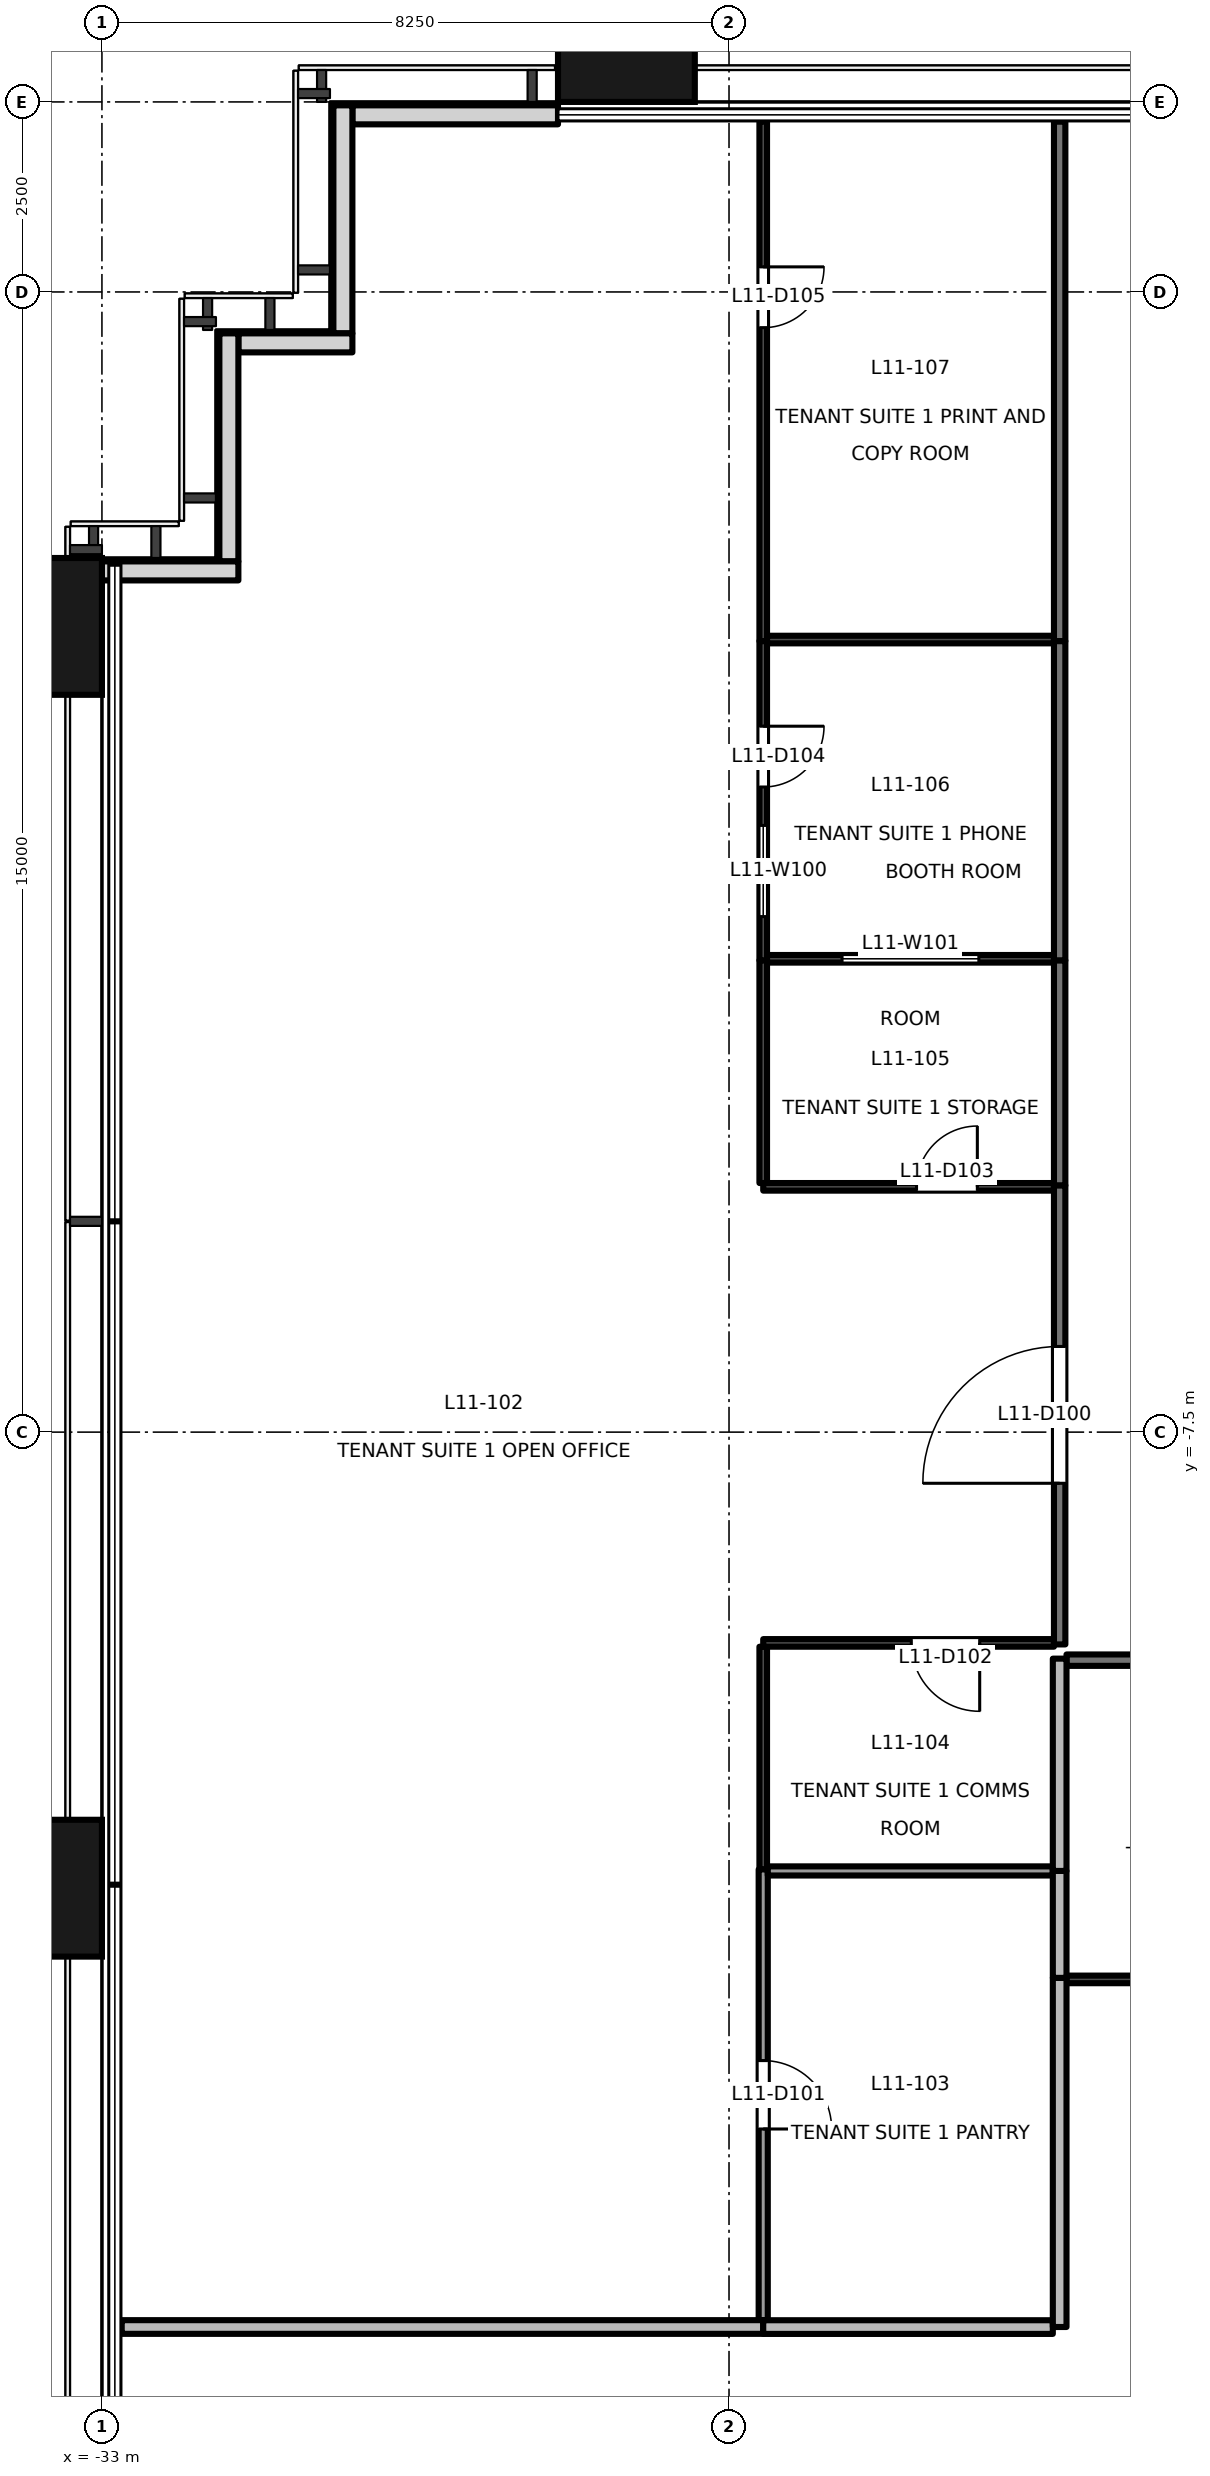
"""IFC4 building model, lengths in metres.
Left out: names, types, materials, properties, quantities, classifications, styles, units other than length and angle.
Written with IfcOpenShell. Run it as: python <this file> out.ifc"""

import sys

from ifc_helpers import new_model, si_unit, direction, frame, frame_2d, origin, origin_2d, place, context, subcontext, project, spatial, rectangle, extrude, element, fill, save


model = new_model("IFC4")
c1 = context("Model", 3, precision=1e-05, world=origin(), true_north=direction((0.0, 1.0)))
c2 = subcontext(c1, "Body", "Model", "MODEL_VIEW")
j1 = project(units=[si_unit("LENGTHUNIT", "METRE"), si_unit("PLANEANGLEUNIT", "RADIAN")], contexts=[c1])
p1 = place(None, origin())
s1 = spatial("IfcSite", under=j1, at=p1, CompositionType="ELEMENT")
p2 = place(p1, origin())
s2 = spatial("IfcBuilding", under=s1, at=p2, CompositionType="ELEMENT")
p3 = place(p2, frame((0.0, 0.0, 52.9)))
s3 = spatial("IfcBuildingStorey", under=s2, at=p3, CompositionType="ELEMENT", Elevation=52.9)
for number, where, z_axis, x_axis in (
    (1, (-33.9, -13.5, -0.2), (0.0, 0.0, 1.0), (0.0, 1.0, 0.0)),
    (2, (-33.9, 3.1, -0.2), (0.0, 0.0, 1.0), (0.0, 1.0, 0.0)),
    (3, (-26.1, 10.9, -0.2), (0.0, 0.0, 1.0), (1.0, 0.0, 0.0)),
):
    element("IfcColumn", number, at=place(p3, frame(where, z_axis=z_axis, x_axis=x_axis)), inside=s3, PredefinedType="COLUMN", context=c2, shape_type="SweptSolid", body=[
        extrude(rectangle(XDim=1.8, YDim=1.8, at=origin_2d()), origin(), (0.0, 0.0, 1.0), 4.1),
    ])
p4 = place(p3, frame((-27.0, 9.83, 0.0), z_axis=(0.0, 0.0, 1.0), x_axis=(-1.0, 0.0, 0.0)))
e4 = element("IfcWall", 4, at=p4, inside=s3, PredefinedType="SOLIDWALL", context=c2, shape_type="SweptSolid", body=[
    extrude(rectangle(XDim=2.705, YDim=0.25, at=frame_2d((1.353, 0.0))), origin(), (0.0, 0.0, 1.0), 3.9),
])
p5 = place(p3, frame((-29.83, 9.955, 0.0), z_axis=(0.0, 0.0, 1.0), x_axis=(0.0, -1.0, 0.0)))
e5 = element("IfcWall", 5, at=p5, inside=s3, PredefinedType="SOLIDWALL", context=c2, shape_type="SweptSolid", body=[
    extrude(rectangle(XDim=3.0, YDim=0.25, at=frame_2d((1.5, 0.0))), origin(), (0.0, 0.0, 1.0), 3.9),
])
p6 = place(p3, frame((-29.705, 6.83, 0.0), z_axis=(0.0, 0.0, 1.0), x_axis=(-1.0, 0.0, 0.0)))
e6 = element("IfcWall", 6, at=p6, inside=s3, PredefinedType="SOLIDWALL", context=c2, shape_type="SweptSolid", body=[
    extrude(rectangle(XDim=1.5, YDim=0.25, at=frame_2d((0.75, 0.0))), origin(), (0.0, 0.0, 1.0), 3.9),
])
p7 = place(p3, frame((-31.33, 6.955, 0.0), z_axis=(0.0, 0.0, 1.0), x_axis=(0.0, -1.0, 0.0)))
e7 = element("IfcWall", 7, at=p7, inside=s3, PredefinedType="SOLIDWALL", context=c2, shape_type="SweptSolid", body=[
    extrude(rectangle(XDim=3.0, YDim=0.25, at=frame_2d((1.5, 0.0))), origin(), (0.0, 0.0, 1.0), 3.9),
])
p8 = place(p3, frame((-31.205, 3.83, 0.0), z_axis=(0.0, 0.0, 1.0), x_axis=(-1.0, 0.0, 0.0)))
e8 = element("IfcWall", 8, at=p8, inside=s3, PredefinedType="SOLIDWALL", context=c2, shape_type="SweptSolid", body=[
    extrude(rectangle(XDim=1.8, YDim=0.25, at=frame_2d((0.9, 0.0))), origin(), (0.0, 0.0, 1.0), 3.9),
])
p9 = place(p3, frame((-20.4, -10.293, 0.0), z_axis=(0.0, 0.0, 1.0), x_axis=(0.0, 1.0, 0.0)))
e9 = element("IfcWall", 9, at=p9, inside=s3, PredefinedType="PARTITIONING", context=c2, shape_type="SweptSolid", body=[
    extrude(rectangle(XDim=6.04, YDim=0.15, at=frame_2d((3.02, 0.0))), origin(), (0.0, 0.0, 1.0), 3.3),
])
p10 = place(p9, frame((2.12, 0.0, 0.0)))
e10 = element("IfcOpeningElement", 10, at=p10, cuts=e9, PredefinedType="OPENING", context=c2, shape_type="SweptSolid", body=[
    extrude(rectangle(XDim=1.8, YDim=2.1, at=frame_2d((0.9, 1.05))), frame((0.0, 0.085, 0.0), z_axis=(0.0, -1.0, 0.0), x_axis=(1.0, 0.0, 0.0)), (0.0, 0.0, 1.0), 0.171),
])
p11 = place(p3, frame((-20.4, -4.253, 0.0), z_axis=(0.0, 0.0, 1.0), x_axis=(0.0, 1.0, 0.0)))
e11 = element("IfcWall", 11, at=p11, inside=s3, PredefinedType="PARTITIONING", context=c2, shape_type="SweptSolid", body=[
    extrude(rectangle(XDim=2.96, YDim=0.15, at=frame_2d((1.48, 0.0))), origin(), (0.0, 0.0, 1.0), 3.9),
])
p12 = place(p3, frame((-20.4, -1.293, 0.0), z_axis=(0.0, 0.0, 1.0), x_axis=(0.0, 1.0, 0.0)))
e12 = element("IfcWall", 12, at=p12, inside=s3, PredefinedType="PARTITIONING", context=c2, shape_type="SweptSolid", body=[
    extrude(rectangle(XDim=4.2, YDim=0.15, at=frame_2d((2.1, 0.0))), origin(), (0.0, 0.0, 1.0), 3.3),
])
p13 = place(p3, frame((-20.4, 2.907, 0.0), z_axis=(0.0, 0.0, 1.0), x_axis=(0.0, 1.0, 0.0)))
e13 = element("IfcWall", 13, at=p13, inside=s3, PredefinedType="PARTITIONING", context=c2, shape_type="SweptSolid", body=[
    extrude(rectangle(XDim=6.833, YDim=0.15, at=frame_2d((3.417, 0.0))), origin(), (0.0, 0.0, 1.0), 3.9),
])
p14 = place(p3, frame((-14.68, -10.5, 0.0), z_axis=(0.0, 0.0, 1.0), x_axis=(-1.0, 0.0, 0.0)))
e14 = element("IfcWall", 14, at=p14, inside=s3, PredefinedType="PARTITIONING", context=c2, shape_type="SweptSolid", body=[
    extrude(rectangle(XDim=5.63, YDim=0.15, at=frame_2d((2.815, 0.0))), origin(), (0.0, 0.0, 1.0), 2.5),
])
p15 = place(p3, frame((-24.3, -13.253, 0.0), z_axis=(0.0, 0.0, 1.0), x_axis=(0.0, -1.0, 0.0)))
e15 = element("IfcWall", 15, at=p15, inside=s3, PredefinedType="PARTITIONING", context=c2, shape_type="SweptSolid", body=[
    extrude(rectangle(XDim=5.93, YDim=0.12, at=frame_2d((2.965, 0.0))), origin(), (0.0, 0.0, 1.0), 3.3),
])
p16 = place(p15, frame((2.515, 0.0, 0.0)))
e16 = element("IfcOpeningElement", 16, at=p16, cuts=e15, PredefinedType="OPENING", context=c2, shape_type="SweptSolid", body=[
    extrude(rectangle(XDim=0.9, YDim=2.1, at=frame_2d((0.45, 1.05))), frame((0.0, 0.071, 0.0), z_axis=(0.0, -1.0, 0.0), x_axis=(1.0, 0.0, 0.0)), (0.0, 0.0, 1.0), 0.141),
])
p17 = place(p3, frame((-24.3, -10.323, 0.0), z_axis=(0.0, 0.0, 1.0), x_axis=(0.0, -1.0, 0.0)))
e17 = element("IfcWall", 17, at=p17, inside=s3, PredefinedType="PARTITIONING", context=c2, shape_type="SweptSolid", body=[
    extrude(rectangle(XDim=2.93, YDim=0.1, at=frame_2d((1.465, 0.0))), origin(), (0.0, 0.0, 1.0), 3.9),
])
p18 = place(p3, frame((-20.475, -10.273, 0.0), z_axis=(0.0, 0.0, 1.0), x_axis=(-1.0, 0.0, 0.0)))
e18 = element("IfcWall", 18, at=p18, inside=s3, PredefinedType="PARTITIONING", context=c2, shape_type="SweptSolid", body=[
    extrude(rectangle(XDim=3.825, YDim=0.1, at=frame_2d((1.913, 0.0))), origin(), (0.0, 0.0, 1.0), 3.9),
])
p19 = place(p18, frame((0.977, 0.0, 0.0)))
e19 = element("IfcOpeningElement", 19, at=p19, cuts=e18, PredefinedType="OPENING", context=c2, shape_type="SweptSolid", body=[
    extrude(rectangle(XDim=0.9, YDim=2.1, at=frame_2d((0.45, 1.05))), frame((0.0, 0.061, 0.0), z_axis=(0.0, -1.0, 0.0), x_axis=(1.0, 0.0, 0.0)), (0.0, 0.0, 1.0), 0.121),
])
p20 = place(p3, frame((-24.3, -1.293, 0.0), z_axis=(0.0, 0.0, 1.0), x_axis=(0.0, -1.0, 0.0)))
e20 = element("IfcWall", 20, at=p20, inside=s3, PredefinedType="PARTITIONING", context=c2, shape_type="SweptSolid", body=[
    extrude(rectangle(XDim=2.93, YDim=0.1, at=frame_2d((1.465, 0.0))), origin(), (0.0, 0.0, 1.0), 3.9),
])
p21 = place(p3, frame((-24.3, -4.273, 0.0), z_axis=(0.0, 0.0, 1.0), x_axis=(1.0, 0.0, 0.0)))
e21 = element("IfcWall", 21, at=p21, inside=s3, PredefinedType="PARTITIONING", context=c2, shape_type="SweptSolid", body=[
    extrude(rectangle(XDim=3.825, YDim=0.1, at=frame_2d((1.913, 0.0))), origin(), (0.0, 0.0, 1.0), 3.9),
])
p22 = place(p21, frame((2.017, 0.0, 0.0)))
e22 = element("IfcOpeningElement", 22, at=p22, cuts=e21, PredefinedType="OPENING", context=c2, shape_type="SweptSolid", body=[
    extrude(rectangle(XDim=0.8, YDim=2.1, at=frame_2d((0.4, 1.05))), frame((0.0, 0.061, 0.0), z_axis=(0.0, -1.0, 0.0), x_axis=(1.0, 0.0, 0.0)), (0.0, 0.0, 1.0), 0.121),
])
p23 = place(p3, frame((-24.3, 2.907, 0.0), z_axis=(0.0, 0.0, 1.0), x_axis=(0.0, -1.0, 0.0)))
e23 = element("IfcWall", 23, at=p23, inside=s3, PredefinedType="PARTITIONING", context=c2, shape_type="SweptSolid", body=[
    extrude(rectangle(XDim=4.2, YDim=0.1, at=frame_2d((2.1, 0.0))), origin(), (0.0, 0.0, 1.0), 3.3),
])
p24 = place(p23, frame((1.12, 0.0, 0.0)))
e24 = element("IfcOpeningElement", 24, at=p24, cuts=e23, PredefinedType="OPENING", context=c2, shape_type="SweptSolid", body=[
    extrude(rectangle(XDim=0.8, YDim=2.1, at=frame_2d((0.4, 1.05))), frame((0.0, 0.061, 0.0), z_axis=(0.0, -1.0, 0.0), x_axis=(1.0, 0.0, 0.0)), (0.0, 0.0, 1.0), 0.121),
])
p25 = place(p23, frame((2.425, 0.0, 0.9)))
e25 = element("IfcOpeningElement", 25, at=p25, cuts=e23, PredefinedType="OPENING", context=c2, shape_type="SweptSolid", body=[
    extrude(rectangle(XDim=1.2, YDim=1.2, at=frame_2d((0.6, 0.6))), frame((0.0, 0.061, 0.0), z_axis=(0.0, -1.0, 0.0), x_axis=(1.0, 0.0, 0.0)), (0.0, 0.0, 1.0), 0.121),
])
p26 = place(p3, frame((-24.3, 9.74, 0.0), z_axis=(0.0, 0.0, 1.0), x_axis=(0.0, -1.0, 0.0)))
e26 = element("IfcWall", 26, at=p26, inside=s3, PredefinedType="PARTITIONING", context=c2, shape_type="SweptSolid", body=[
    extrude(rectangle(XDim=6.833, YDim=0.1, at=frame_2d((3.417, 0.0))), origin(), (0.0, 0.0, 1.0), 3.9),
])
p27 = place(p26, frame((1.91, 0.0, 0.0)))
e27 = element("IfcOpeningElement", 27, at=p27, cuts=e26, PredefinedType="OPENING", context=c2, shape_type="SweptSolid", body=[
    extrude(rectangle(XDim=0.8, YDim=2.1, at=frame_2d((0.4, 1.05))), frame((0.0, 0.061, 0.0), z_axis=(0.0, -1.0, 0.0), x_axis=(1.0, 0.0, 0.0)), (0.0, 0.0, 1.0), 0.121),
])
p28 = place(p3, frame((-24.3, -19.273, 0.0), z_axis=(0.0, 0.0, 1.0), x_axis=(-1.0, 0.0, 0.0)))
e28 = element("IfcWall", 28, at=p28, inside=s3, PredefinedType="PARTITIONING", context=c2, shape_type="SweptSolid", body=[
    extrude(rectangle(XDim=8.44, YDim=0.18, at=frame_2d((4.22, 0.0))), origin(), (0.0, 0.0, 1.0), 3.9),
])
p29 = place(p3, frame((-24.24, -13.273, 0.0), z_axis=(0.0, 0.0, 1.0), x_axis=(1.0, 0.0, 0.0)))
e29 = element("IfcWall", 29, at=p29, inside=s3, PredefinedType="PARTITIONING", context=c2, shape_type="SweptSolid", body=[
    extrude(rectangle(XDim=3.75, YDim=0.12, at=frame_2d((1.875, 0.0))), origin(), (0.0, 0.0, 1.0), 3.9),
])
p30 = place(p3, frame((-20.49, -19.274, 0.0), z_axis=(0.0, 0.0, 1.0), x_axis=(-1.0, 0.0, 0.0)))
e30 = element("IfcWall", 30, at=p30, inside=s3, PredefinedType="PARTITIONING", context=c2, shape_type="SweptSolid", body=[
    extrude(rectangle(XDim=3.81, YDim=0.18, at=frame_2d((1.905, 0.0))), origin(), (0.0, 0.0, 1.0), 3.9),
])
p31 = place(p3, frame((-20.4, -14.68, 0.0), z_axis=(0.0, 0.0, 1.0), x_axis=(0.0, -1.0, 0.0)))
e31 = element("IfcWall", 31, at=p31, inside=s3, PredefinedType="PARTITIONING", context=c2, shape_type="SweptSolid", body=[
    extrude(rectangle(XDim=4.593, YDim=0.18, at=frame_2d((2.296, 0.0))), origin(), (0.0, 0.0, 1.0), 3.3),
])
p32 = place(p3, frame((-20.4, -13.273, 0.0), z_axis=(0.0, 0.0, 1.0), x_axis=(0.0, -1.0, 0.0)))
e32 = element("IfcWall", 32, at=p32, inside=s3, PredefinedType="PARTITIONING", context=c2, shape_type="SweptSolid", body=[
    extrude(rectangle(XDim=1.407, YDim=0.18, at=frame_2d((0.704, 0.0))), origin(), (0.0, 0.0, 1.0), 3.3),
])
p33 = place(p3, frame((-20.4, -10.48, 0.0), z_axis=(0.0, 0.0, 1.0), x_axis=(0.0, -1.0, 0.0)))
e33 = element("IfcWall", 33, at=p33, inside=s3, PredefinedType="PARTITIONING", context=c2, shape_type="SweptSolid", body=[
    extrude(rectangle(XDim=2.793, YDim=0.18, at=frame_2d((1.396, 0.0))), origin(), (0.0, 0.0, 1.0), 3.9),
])
p34 = place(p3, frame((-24.25, -1.273, 0.0), z_axis=(0.0, 0.0, 1.0), x_axis=(1.0, 0.0, 0.0)))
e34 = element("IfcWall", 34, at=p34, inside=s3, PredefinedType="PARTITIONING", context=c2, shape_type="SweptSolid", body=[
    extrude(rectangle(XDim=3.775, YDim=0.1, at=frame_2d((1.887, 0.0))), origin(), (0.0, 0.0, 1.0), 3.9),
])
p35 = place(p34, frame((0.987, 0.0, 0.9)))
e35 = element("IfcOpeningElement", 35, at=p35, cuts=e34, PredefinedType="OPENING", context=c2, shape_type="SweptSolid", body=[
    extrude(rectangle(XDim=1.8, YDim=1.2, at=frame_2d((0.9, 0.6))), frame((0.0, 0.061, 0.0), z_axis=(0.0, -1.0, 0.0), x_axis=(1.0, 0.0, 0.0)), (0.0, 0.0, 1.0), 0.121),
])
p36 = place(p3, frame((-24.25, 2.927, 0.0), z_axis=(0.0, 0.0, 1.0), x_axis=(1.0, 0.0, 0.0)))
e36 = element("IfcWall", 36, at=p36, inside=s3, PredefinedType="PARTITIONING", context=c2, shape_type="SweptSolid", body=[
    extrude(rectangle(XDim=3.775, YDim=0.1, at=frame_2d((1.887, 0.0))), origin(), (0.0, 0.0, 1.0), 3.9),
])
p37 = place(p3, frame((-20.31, -14.7, 0.0), z_axis=(0.0, 0.0, 1.0), x_axis=(1.0, 0.0, 0.0)))
e37 = element("IfcWall", 37, at=p37, inside=s3, PredefinedType="PARTITIONING", context=c2, shape_type="SweptSolid", body=[
    extrude(rectangle(XDim=5.65, YDim=0.1, at=frame_2d((2.825, 0.0))), origin(), (0.0, 0.0, 1.0), 2.5),
])
p38 = place(p37, frame((3.225, 0.0, 0.0)))
e38 = element("IfcOpeningElement", 38, at=p38, cuts=e37, PredefinedType="OPENING", context=c2, shape_type="SweptSolid", body=[
    extrude(rectangle(XDim=0.9, YDim=2.1, at=frame_2d((0.45, 1.05))), frame((0.0, 0.061, 0.0), z_axis=(0.0, -1.0, 0.0), x_axis=(1.0, 0.0, 0.0)), (0.0, 0.0, 1.0), 0.121),
])
p39 = place(p10, origin())
e39 = element("IfcDoor", 39, at=p39, inside=s3, OperationType="DOUBLE_DOOR_SINGLE_SWING", PredefinedType="DOOR", context=c2, shape_type="SweptSolid", body=[
    extrude(rectangle(XDim=1.8, YDim=2.1, at=frame_2d((0.9, 1.05))), frame((0.0, 0.025, 0.0), z_axis=(0.0, -1.0, 0.0), x_axis=(1.0, 0.0, 0.0)), (0.0, 0.0, 1.0), 0.05),
])
fill(e10, e39)
p40 = place(p16, origin())
e40 = element("IfcDoor", 40, at=p40, inside=s3, OperationType="SINGLE_SWING_RIGHT", PredefinedType="DOOR", context=c2, shape_type="SweptSolid", body=[
    extrude(rectangle(XDim=0.9, YDim=2.1, at=frame_2d((0.45, 1.05))), frame((0.0, 0.025, 0.0), z_axis=(0.0, -1.0, 0.0), x_axis=(1.0, 0.0, 0.0)), (0.0, 0.0, 1.0), 0.05),
])
fill(e16, e40)
p41 = place(p19, origin())
e41 = element("IfcDoor", 41, at=p41, inside=s3, OperationType="SINGLE_SWING_LEFT", PredefinedType="DOOR", context=c2, shape_type="SweptSolid", body=[
    extrude(rectangle(XDim=0.9, YDim=2.1, at=frame_2d((0.45, 1.05))), frame((0.0, 0.025, 0.0), z_axis=(0.0, -1.0, 0.0), x_axis=(1.0, 0.0, 0.0)), (0.0, 0.0, 1.0), 0.05),
])
fill(e19, e41)
p42 = place(p22, origin())
e42 = element("IfcDoor", 42, at=p42, inside=s3, OperationType="SINGLE_SWING_RIGHT", PredefinedType="DOOR", context=c2, shape_type="SweptSolid", body=[
    extrude(rectangle(XDim=0.8, YDim=2.1, at=frame_2d((0.4, 1.05))), frame((0.0, 0.025, 0.0), z_axis=(0.0, -1.0, 0.0), x_axis=(1.0, 0.0, 0.0)), (0.0, 0.0, 1.0), 0.05),
])
fill(e22, e42)
p43 = place(p24, origin())
e43 = element("IfcDoor", 43, at=p43, inside=s3, OperationType="SINGLE_SWING_LEFT", PredefinedType="DOOR", context=c2, shape_type="SweptSolid", body=[
    extrude(rectangle(XDim=0.8, YDim=2.1, at=frame_2d((0.4, 1.05))), frame((0.0, 0.025, 0.0), z_axis=(0.0, -1.0, 0.0), x_axis=(1.0, 0.0, 0.0)), (0.0, 0.0, 1.0), 0.05),
])
fill(e24, e43)
p44 = place(p27, origin())
e44 = element("IfcDoor", 44, at=p44, inside=s3, OperationType="SINGLE_SWING_LEFT", PredefinedType="DOOR", context=c2, shape_type="SweptSolid", body=[
    extrude(rectangle(XDim=0.8, YDim=2.1, at=frame_2d((0.4, 1.05))), frame((0.0, 0.025, 0.0), z_axis=(0.0, -1.0, 0.0), x_axis=(1.0, 0.0, 0.0)), (0.0, 0.0, 1.0), 0.05),
])
fill(e27, e44)
p45 = place(p25, origin())
e45 = element("IfcWindow", 45, at=p45, inside=s3, PartitioningType="SINGLE_PANEL", PredefinedType="WINDOW", context=c2, shape_type="SweptSolid", body=[
    extrude(rectangle(XDim=1.2, YDim=1.2, at=frame_2d((0.6, 0.6))), frame((0.0, 0.03, 0.0), z_axis=(0.0, -1.0, 0.0), x_axis=(1.0, 0.0, 0.0)), (0.0, 0.0, 1.0), 0.06),
])
fill(e25, e45)
p46 = place(p35, origin())
e46 = element("IfcWindow", 46, at=p46, inside=s3, PartitioningType="SINGLE_PANEL", PredefinedType="WINDOW", context=c2, shape_type="SweptSolid", body=[
    extrude(rectangle(XDim=1.8, YDim=1.2, at=frame_2d((0.9, 0.6))), frame((0.0, 0.03, 0.0), z_axis=(0.0, -1.0, 0.0), x_axis=(1.0, 0.0, 0.0)), (0.0, 0.0, 1.0), 0.06),
])
fill(e35, e46)
save(model, sys.argv[1])
